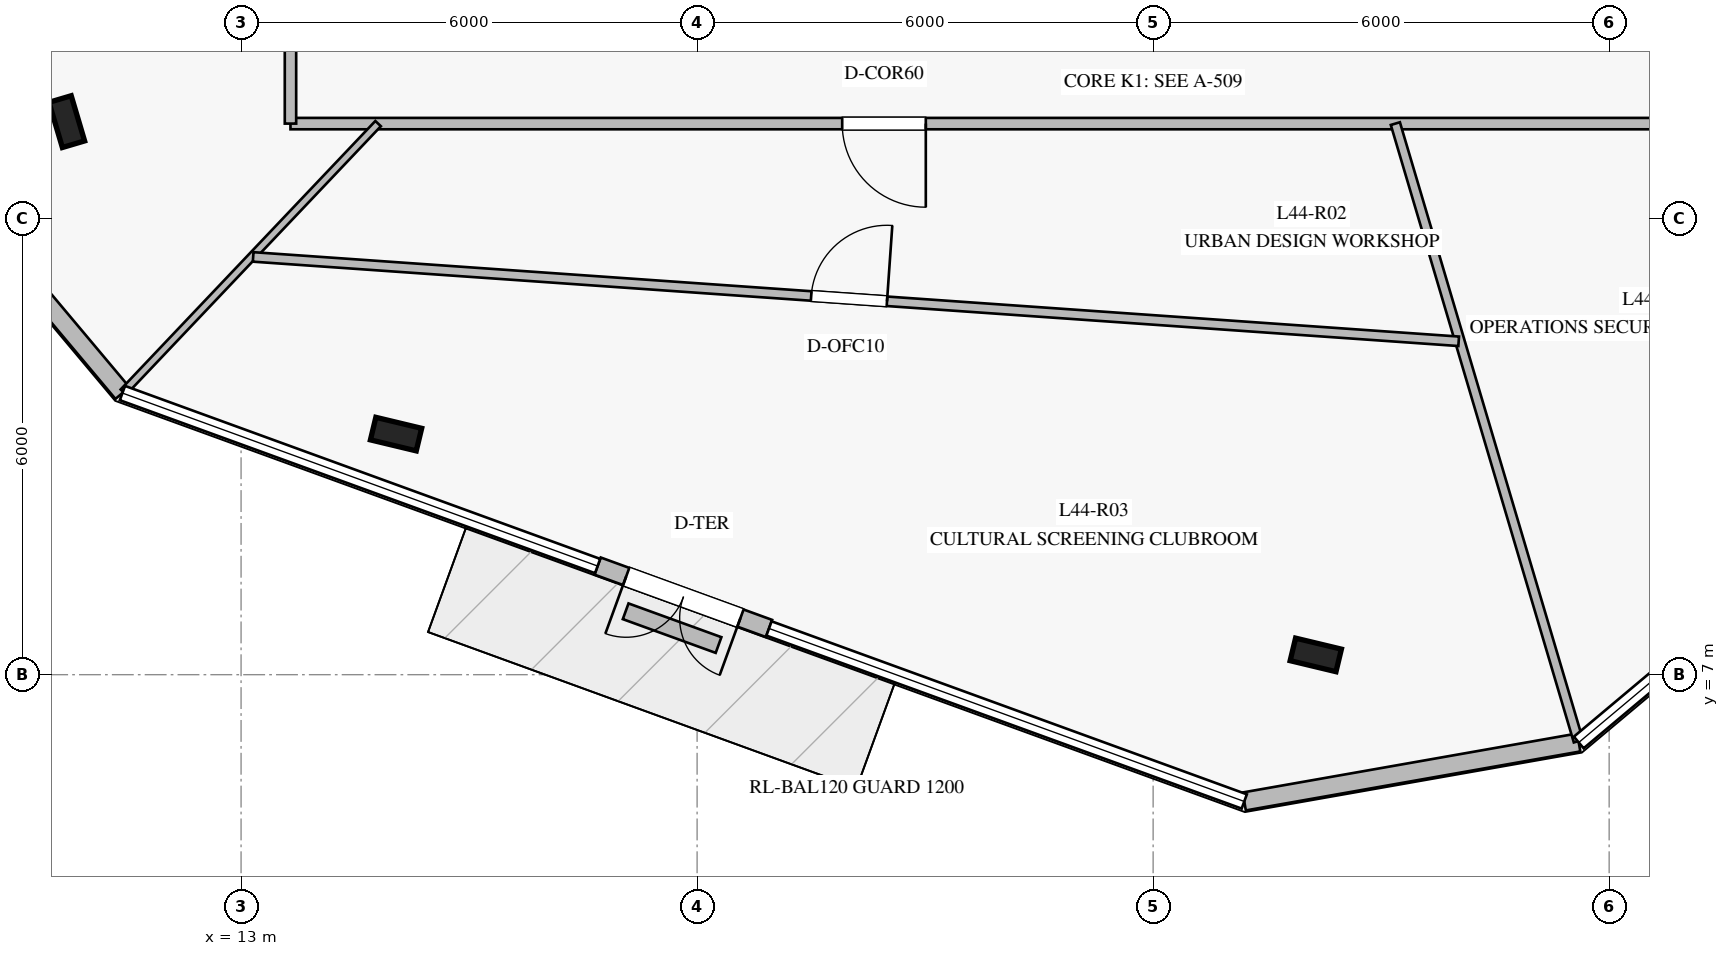
"""IFC4 building model, lengths in metres.
Left out: names, types, materials, properties, quantities, classifications, styles, units other than length and angle.
Written with IfcOpenShell. Run it as: python <this file> out.ifc"""

import sys

from ifc_helpers import new_model, si_unit, direction, frame, frame_2d, origin, origin_2d, place, context, subcontext, project, spatial, rectangle, i_section, extrude, element, fill, save


model = new_model("IFC4")
c1 = context("Model", 3, precision=1e-05, world=origin(), true_north=direction((0.0, 1.0)))
c2 = subcontext(c1, "Body", "Model", "MODEL_VIEW")
j1 = project(units=[si_unit("LENGTHUNIT", "METRE"), si_unit("PLANEANGLEUNIT", "RADIAN")], contexts=[c1])
p1 = place(None, origin())
s1 = spatial("IfcSite", under=j1, at=p1, CompositionType="ELEMENT")
p2 = place(p1, origin())
s2 = spatial("IfcBuilding", under=s1, at=p2, CompositionType="ELEMENT")
p3 = place(p2, frame((0.0, 0.0, 184.8)))
s3 = spatial("IfcBuildingStorey", under=s2, at=p3, CompositionType="ELEMENT", Elevation=184.8)
for number, where, z_axis, x_axis in (
    (1, (10.707, 14.276, 0.0), (0.0, 0.0, 1.0), (-0.284, 0.959, 0.0)),
    (2, (15.039, 10.165, 0.0), (0.0, 0.0, 1.0), (-0.972, 0.233, 0.0)),
    (3, (27.14, 7.26, 0.0), (0.0, 0.0, 1.0), (-0.972, 0.233, 0.0)),
):
    element("IfcColumn", number, at=place(p3, frame(where, z_axis=z_axis, x_axis=x_axis)), inside=s3, PredefinedType="COLUMN", context=c2, shape_type="SweptSolid", body=[
        extrude(i_section(OverallWidth=0.305, OverallDepth=0.62, WebThickness=0.021, FlangeThickness=0.04, at=origin_2d()), origin(), (0.0, 0.0, 1.0), 4.0),
    ])
p4 = place(p3, frame((8.567, 14.127, 0.0), z_axis=(0.0, 0.0, 1.0), x_axis=(0.642889570515, -0.765958876261, 0.0)))
e4 = element("IfcWall", 4, at=p4, inside=s3, PredefinedType="STANDARD", context=c2, shape_type="SweptSolid", body=[
    extrude(rectangle(XDim=4.468, YDim=0.24, at=frame_2d((2.234, 0.0))), origin(), (0.0, 0.0, 1.0), 3.78),
])
p5 = place(p3, frame((17.691, 8.429, 0.0), z_axis=(0.0, 0.0, 1.0), x_axis=(0.939659694648, -0.342110593602, 0.0)))
e5 = element("IfcWall", 5, at=p5, inside=s3, PredefinedType="STANDARD", context=c2, shape_type="SweptSolid", body=[
    extrude(rectangle(XDim=2.4, YDim=0.24, at=frame_2d((1.2, 0.0))), origin(), (0.0, 0.0, 1.0), 3.78),
])
p6 = place(p5, frame((0.4, 0.0, 0.0)))
e6 = element("IfcOpeningElement", 6, at=p6, cuts=e5, PredefinedType="OPENING", context=c2, shape_type="SweptSolid", body=[
    extrude(rectangle(XDim=1.6, YDim=2.25, at=frame_2d((0.8, 1.125))), frame((0.0, 0.13, 0.0), z_axis=(0.0, -1.0, 0.0), x_axis=(1.0, 0.0, 0.0)), (0.0, 0.0, 1.0), 0.26),
])
p7 = place(p3, frame((26.199, 5.332, 0.0), z_axis=(0.0, 0.0, 1.0), x_axis=(0.984813792018, 0.173613925281, 0.0)))
e7 = element("IfcWall", 7, at=p7, inside=s3, PredefinedType="STANDARD", context=c2, shape_type="SweptSolid", body=[
    extrude(rectangle(XDim=4.469, YDim=0.24, at=frame_2d((2.234, 0.0))), origin(), (0.0, 0.0, 1.0), 3.78),
])
p8 = place(p3, frame((18.06, 7.834, 0.0), z_axis=(0.0, 0.0, 1.0), x_axis=(0.93985371871, -0.341577205661, 0.0)))
e8 = element("IfcWall", 8, at=p8, inside=s3, PredefinedType="USERDEFINED", context=c2, shape_type="SweptSolid", body=[
    extrude(rectangle(XDim=1.3, YDim=0.22, at=frame_2d((0.65, 0.0))), origin(), (0.0, 0.0, 1.0), 0.4),
])
p9 = place(p3, frame((36.35, 14.25, 0.0), z_axis=(0.0, 0.0, 1.0), x_axis=(-1.0, 0.0, 0.0)))
e9 = element("IfcWall", 9, at=p9, inside=s3, PredefinedType="PARTITIONING", context=c2, shape_type="SweptSolid", body=[
    extrude(rectangle(XDim=22.7, YDim=0.15, at=frame_2d((11.35, 0.0))), origin(), (0.0, 0.0, 1.0), 3.05),
])
p10 = place(p9, frame((14.341, 0.0, 0.0)))
e10 = element("IfcOpeningElement", 10, at=p10, cuts=e9, PredefinedType="OPENING", context=c2, shape_type="SweptSolid", body=[
    extrude(rectangle(XDim=1.1, YDim=2.2, at=frame_2d((0.55, 1.1))), frame((0.0, 0.085, 0.0), z_axis=(0.0, -1.0, 0.0), x_axis=(1.0, 0.0, 0.0)), (0.0, 0.0, 1.0), 0.17),
])
p11 = place(p3, frame((13.65, 14.25, 0.0), z_axis=(0.0, 0.0, 1.0), x_axis=(0.0, 1.0, 0.0)))
e11 = element("IfcWall", 11, at=p11, inside=s3, PredefinedType="PARTITIONING", context=c2, shape_type="SweptSolid", body=[
    extrude(rectangle(XDim=21.5, YDim=0.15, at=frame_2d((10.75, 0.0))), origin(), (0.0, 0.0, 1.0), 3.05),
])
p12 = place(p11, frame((5.145, 0.0, 0.0)))
e12 = element("IfcOpeningElement", 12, at=p12, cuts=e11, PredefinedType="OPENING", context=c2, shape_type="SweptSolid", body=[
    extrude(rectangle(XDim=1.1, YDim=2.2, at=frame_2d((0.55, 1.1))), frame((0.0, 0.085, 0.0), z_axis=(0.0, -1.0, 0.0), x_axis=(1.0, 0.0, 0.0)), (0.0, 0.0, 1.0), 0.17),
])
p13 = place(p3, frame((14.803, 14.25, 0.0), z_axis=(0.0, 0.0, 1.0), x_axis=(-0.688284115744, -0.725441228505, 0.0)))
e13 = element("IfcWall", 13, at=p13, inside=s3, PredefinedType="MOVABLE", context=c2, shape_type="SweptSolid", body=[
    extrude(rectangle(XDim=4.869, YDim=0.1, at=frame_2d((2.434, 0.0))), origin(), (0.0, 0.0, 1.0), 3.18),
])
p14 = place(p3, frame((28.187, 14.25, 0.0), z_axis=(0.0, 0.0, 1.0), x_axis=(0.284179562535, -0.958771076033, 0.0)))
e14 = element("IfcWall", 14, at=p14, inside=s3, PredefinedType="PARTITIONING", context=c2, shape_type="SweptSolid", body=[
    extrude(rectangle(XDim=8.473, YDim=0.125, at=frame_2d((4.237, 0.0))), origin(), (0.0, 0.0, 1.0), 3.18),
])
p15 = place(p3, frame((13.159, 12.496, 0.0), z_axis=(0.0, 0.0, 1.0), x_axis=(0.99755970511, -0.069818584499, 0.0)))
e15 = element("IfcWall", 15, at=p15, inside=s3, PredefinedType="PARTITIONING", context=c2, shape_type="SweptSolid", body=[
    extrude(rectangle(XDim=15.9, YDim=0.125, at=frame_2d((7.95, 0.0))), origin(), (0.0, 0.0, 1.0), 3.28),
])
p16 = place(p15, frame((7.36, 0.0, 0.0)))
e16 = element("IfcOpeningElement", 16, at=p16, cuts=e15, PredefinedType="OPENING", context=c2, shape_type="SweptSolid", body=[
    extrude(rectangle(XDim=1.0, YDim=2.15, at=frame_2d((0.5, 1.075))), frame((0.0, 0.073, 0.0), z_axis=(0.0, -1.0, 0.0), x_axis=(1.0, 0.0, 0.0)), (0.0, 0.0, 1.0), 0.145),
])
p17 = place(p6, frame((1.6, 0.0, 0.0), z_axis=(0.0, 0.0, 1.0), x_axis=(-1.0, 0.0, 0.0)))
e17 = element("IfcDoor", 17, at=p17, inside=s3, OperationType="DOUBLE_DOOR_SINGLE_SWING", PredefinedType="DOOR", context=c2, shape_type="SweptSolid", body=[
    extrude(rectangle(XDim=1.6, YDim=2.25, at=frame_2d((0.8, 1.125))), frame((0.0, 0.025, 0.0), z_axis=(0.0, -1.0, 0.0), x_axis=(1.0, 0.0, 0.0)), (0.0, 0.0, 1.0), 0.05),
])
fill(e6, e17)
p18 = place(p10, origin())
e18 = element("IfcDoor", 18, at=p18, inside=s3, OperationType="SINGLE_SWING_LEFT", PredefinedType="DOOR", context=c2, shape_type="SweptSolid", body=[
    extrude(rectangle(XDim=1.1, YDim=2.2, at=frame_2d((0.55, 1.1))), frame((0.0, 0.025, 0.0), z_axis=(0.0, -1.0, 0.0), x_axis=(1.0, 0.0, 0.0)), (0.0, 0.0, 1.0), 0.05),
])
fill(e10, e18)
p19 = place(p16, origin())
e19 = element("IfcDoor", 19, at=p19, inside=s3, OperationType="SINGLE_SWING_RIGHT", PredefinedType="DOOR", context=c2, shape_type="SweptSolid", body=[
    extrude(rectangle(XDim=1.0, YDim=2.15, at=frame_2d((0.5, 1.075))), frame((0.0, 0.025, 0.0), z_axis=(0.0, -1.0, 0.0), x_axis=(1.0, 0.0, 0.0)), (0.0, 0.0, 1.0), 0.05),
])
fill(e16, e19)
save(model, sys.argv[1])
